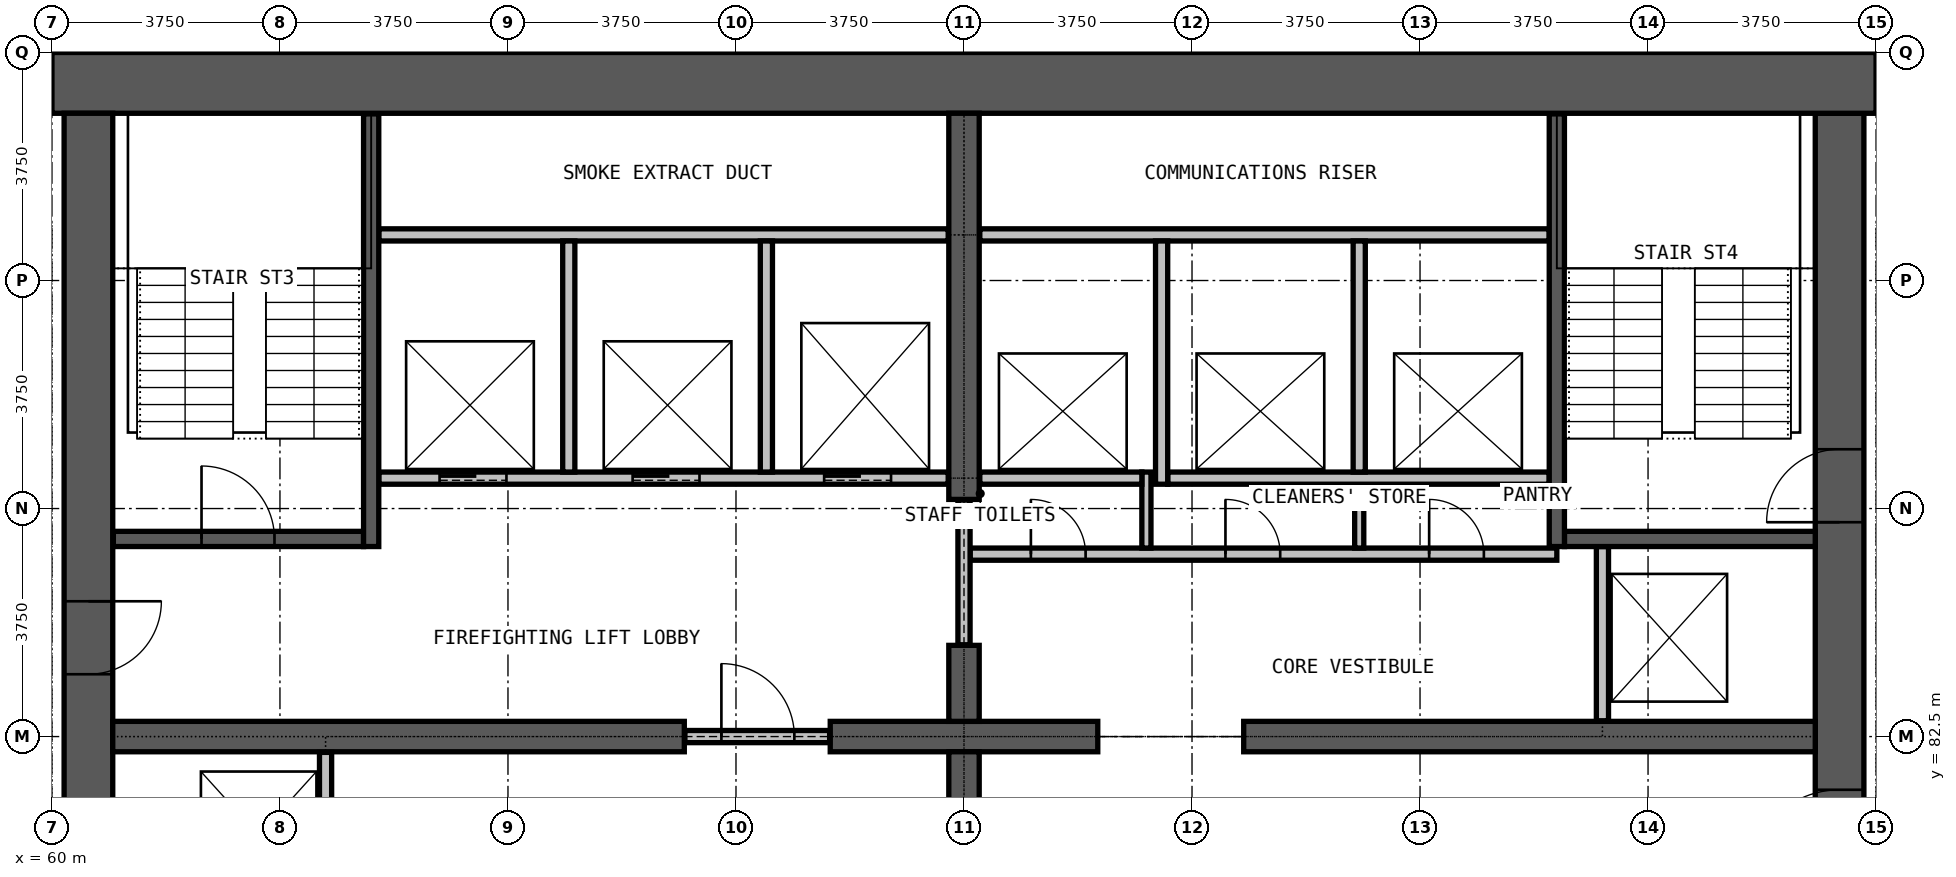
"""IFC4 building model, lengths in metres.
Left out: names, types, materials, properties, quantities, classifications, styles, units other than length and angle.
Written with IfcOpenShell. Run it as: python <this file> out.ifc"""

import sys

from ifc_helpers import new_model, si_unit, direction, frame, frame_2d, origin, place, context, subcontext, project, spatial, rectangle, extrude, element, fill, save


model = new_model("IFC4")
c1 = context("Model", 3, precision=1e-05, world=origin(), true_north=direction((0.0, 1.0)))
c2 = subcontext(c1, "Body", "Model", "MODEL_VIEW")
j1 = project(units=[si_unit("LENGTHUNIT", "METRE"), si_unit("PLANEANGLEUNIT", "RADIAN")], contexts=[c1])
p1 = place(None, origin())
s1 = spatial("IfcSite", under=j1, at=p1, CompositionType="ELEMENT")
p2 = place(p1, origin())
s2 = spatial("IfcBuilding", under=s1, at=p2, CompositionType="ELEMENT")
p3 = place(p2, frame((0.0, 0.0, 139.6)))
s3 = spatial("IfcBuildingStorey", under=s2, at=p3, CompositionType="ELEMENT", Elevation=139.6)
p4 = place(p3, frame((89.4, 72.25, 0.0), z_axis=(0.0, 0.0, 1.0), x_axis=(0.0, 1.0, 0.0)))
e1 = element("IfcWall", 1, at=p4, inside=s3, PredefinedType="SHEAR", context=c2, shape_type="SweptSolid", body=[
    extrude(rectangle(XDim=20.5, YDim=0.8, at=frame_2d((10.25, 0.0))), origin(), (0.0, 0.0, 1.0), 3.6),
])
p5 = place(p4, frame((0.275, 0.0, 0.0)))
e2 = element("IfcOpeningElement", 2, at=p5, cuts=e1, PredefinedType="OPENING", context=c2, shape_type="SweptSolid", body=[
    extrude(rectangle(XDim=1.2, YDim=2.2, at=frame_2d((0.6, 1.1))), frame((0.0, 0.41, 0.0), z_axis=(0.0, -1.0, 0.0), x_axis=(1.0, 0.0, 0.0)), (0.0, 0.0, 1.0), 0.82),
])
p6 = place(p4, frame((13.775, 0.0, 0.0)))
e3 = element("IfcOpeningElement", 3, at=p6, cuts=e1, PredefinedType="OPENING", context=c2, shape_type="SweptSolid", body=[
    extrude(rectangle(XDim=1.2, YDim=2.2, at=frame_2d((0.6, 1.1))), frame((0.0, 0.41, 0.0), z_axis=(0.0, -1.0, 0.0), x_axis=(1.0, 0.0, 0.0)), (0.0, 0.0, 1.0), 0.82),
])
p7 = place(p4, frame((7.875, 0.0, 0.0)))
e4 = element("IfcOpeningElement", 4, at=p7, cuts=e1, PredefinedType="OPENING", context=c2, shape_type="SweptSolid", body=[
    extrude(rectangle(XDim=1.5, YDim=2.2, at=frame_2d((0.75, 1.1))), frame((0.0, 0.41, 0.0), z_axis=(0.0, -1.0, 0.0), x_axis=(1.0, 0.0, 0.0)), (0.0, 0.0, 1.0), 0.82),
])
p8 = place(p3, frame((90.0, 93.25, 0.0), z_axis=(0.0, 0.0, 1.0), x_axis=(-1.0, 0.0, 0.0)))
e5 = element("IfcWall", 5, at=p8, inside=s3, PredefinedType="SHEAR", context=c2, shape_type="SweptSolid", body=[
    extrude(rectangle(XDim=30.0, YDim=1.0, at=frame_2d((15.0, 0.0))), origin(), (0.0, 0.0, 1.0), 3.6),
])
p9 = place(p3, frame((60.6, 92.75, 0.0), z_axis=(0.0, 0.0, 1.0), x_axis=(0.0, -1.0, 0.0)))
e6 = element("IfcWall", 6, at=p9, inside=s3, PredefinedType="SHEAR", context=c2, shape_type="SweptSolid", body=[
    extrude(rectangle(XDim=20.5, YDim=0.8, at=frame_2d((10.25, 0.0))), origin(), (0.0, 0.0, 1.0), 3.6),
])
p10 = place(p9, frame((19.025, 0.0, 0.0)))
e7 = element("IfcOpeningElement", 7, at=p10, cuts=e6, PredefinedType="OPENING", context=c2, shape_type="SweptSolid", body=[
    extrude(rectangle(XDim=1.2, YDim=2.2, at=frame_2d((0.6, 1.1))), frame((0.0, 0.41, 0.0), z_axis=(0.0, -1.0, 0.0), x_axis=(1.0, 0.0, 0.0)), (0.0, 0.0, 1.0), 0.82),
])
p11 = place(p9, frame((8.025, 0.0, 0.0)))
e8 = element("IfcOpeningElement", 8, at=p11, cuts=e6, PredefinedType="OPENING", context=c2, shape_type="SweptSolid", body=[
    extrude(rectangle(XDim=1.2, YDim=2.2, at=frame_2d((0.6, 1.1))), frame((0.0, 0.41, 0.0), z_axis=(0.0, -1.0, 0.0), x_axis=(1.0, 0.0, 0.0)), (0.0, 0.0, 1.0), 0.82),
])
p12 = place(p3, frame((61.0, 82.5, 0.0), z_axis=(0.0, 0.0, 1.0), x_axis=(1.0, 0.0, 0.0)))
e9 = element("IfcWall", 9, at=p12, inside=s3, PredefinedType="SHEAR", context=c2, shape_type="SweptSolid", body=[
    extrude(rectangle(XDim=9.4, YDim=0.5, at=frame_2d((4.7, 0.0))), origin(), (0.0, 0.0, 1.0), 3.6),
])
p13 = place(p3, frame((72.8, 82.5, 0.0), z_axis=(0.0, 0.0, 1.0), x_axis=(1.0, 0.0, 0.0)))
e10 = element("IfcWall", 10, at=p13, inside=s3, PredefinedType="SHEAR", context=c2, shape_type="SweptSolid", body=[
    extrude(rectangle(XDim=4.4, YDim=0.5, at=frame_2d((2.2, 0.0))), origin(), (0.0, 0.0, 1.0), 3.6),
])
p14 = place(p3, frame((79.6, 82.5, 0.0), z_axis=(0.0, 0.0, 1.0), x_axis=(1.0, 0.0, 0.0)))
e11 = element("IfcWall", 11, at=p14, inside=s3, PredefinedType="SHEAR", context=c2, shape_type="SweptSolid", body=[
    extrude(rectangle(XDim=9.4, YDim=0.5, at=frame_2d((4.7, 0.0))), origin(), (0.0, 0.0, 1.0), 3.6),
])
for number, where, z_axis, x_axis in (
    (12, (75.0, 81.0, 0.0), (0.0, 0.0, 1.0), (0.0, 1.0, 0.0)),
    (13, (75.0, 82.75, 0.0), (0.0, 0.0, 1.0), (0.0, 1.0, 0.0)),
):
    element("IfcWall", number, at=place(p3, frame(where, z_axis=z_axis, x_axis=x_axis)), inside=s3, PredefinedType="SHEAR", context=c2, shape_type="SweptSolid", body=[
        extrude(rectangle(XDim=1.25, YDim=0.5, at=frame_2d((0.625, 0.0))), origin(), (0.0, 0.0, 1.0), 3.6),
    ])
p15 = place(p3, frame((75.0, 86.4, 0.0), z_axis=(0.0, 0.0, 1.0), x_axis=(0.0, 1.0, 0.0)))
e14 = element("IfcWall", 14, at=p15, inside=s3, PredefinedType="SHEAR", context=c2, shape_type="SweptSolid", body=[
    extrude(rectangle(XDim=6.35, YDim=0.5, at=frame_2d((3.175, 0.0))), origin(), (0.0, 0.0, 1.0), 3.6),
])
p16 = place(p3, frame((70.41, 82.5, 0.0), z_axis=(0.0, 0.0, 1.0), x_axis=(1.0, 0.0, 0.0)))
e15 = element("IfcWall", 15, at=p16, inside=s3, PredefinedType="PARTITIONING", context=c2, shape_type="SweptSolid", body=[
    extrude(rectangle(XDim=2.38, YDim=0.2, at=frame_2d((1.19, 0.0))), origin(), (0.0, 0.0, 1.0), 2.4),
])
p17 = place(p16, frame((0.6, 0.0, 0.0)))
e16 = element("IfcOpeningElement", 16, at=p17, cuts=e15, PredefinedType="OPENING", context=c2, shape_type="SweptSolid", body=[
    extrude(rectangle(XDim=1.2, YDim=2.2, at=frame_2d((0.6, 1.1))), frame((0.0, 0.11, 0.0), z_axis=(0.0, -1.0, 0.0), x_axis=(1.0, 0.0, 0.0)), (0.0, 0.0, 1.0), 0.22),
])
p18 = place(p3, frame((75.1, 85.5, 0.0), z_axis=(0.0, 0.0, 1.0), x_axis=(1.0, 0.0, 0.0)))
e17 = element("IfcWall", 17, at=p18, inside=s3, PredefinedType="PARTITIONING", context=c2, shape_type="SweptSolid", body=[
    extrude(rectangle(XDim=9.65, YDim=0.2, at=frame_2d((4.825, 0.0))), origin(), (0.0, 0.0, 1.0), 3.3),
])
p19 = place(p18, frame((1.0, 0.0, 0.0)))
e18 = element("IfcOpeningElement", 18, at=p19, cuts=e17, PredefinedType="OPENING", context=c2, shape_type="SweptSolid", body=[
    extrude(rectangle(XDim=0.9, YDim=2.2, at=frame_2d((0.45, 1.1))), frame((0.0, 0.11, 0.0), z_axis=(0.0, -1.0, 0.0), x_axis=(1.0, 0.0, 0.0)), (0.0, 0.0, 1.0), 0.22),
])
p20 = place(p18, frame((4.2, 0.0, 0.0)))
e19 = element("IfcOpeningElement", 19, at=p20, cuts=e17, PredefinedType="OPENING", context=c2, shape_type="SweptSolid", body=[
    extrude(rectangle(XDim=0.9, YDim=2.2, at=frame_2d((0.45, 1.1))), frame((0.0, 0.11, 0.0), z_axis=(0.0, -1.0, 0.0), x_axis=(1.0, 0.0, 0.0)), (0.0, 0.0, 1.0), 0.22),
])
p21 = place(p18, frame((7.55, 0.0, 0.0)))
e20 = element("IfcOpeningElement", 20, at=p21, cuts=e17, PredefinedType="OPENING", context=c2, shape_type="SweptSolid", body=[
    extrude(rectangle(XDim=0.9, YDim=2.2, at=frame_2d((0.45, 1.1))), frame((0.0, 0.11, 0.0), z_axis=(0.0, -1.0, 0.0), x_axis=(1.0, 0.0, 0.0)), (0.0, 0.0, 1.0), 0.22),
])
p22 = place(p3, frame((75.0, 84.01, 0.0), z_axis=(0.0, 0.0, 1.0), x_axis=(0.0, 1.0, 0.0)))
e21 = element("IfcWall", 21, at=p22, inside=s3, PredefinedType="PARTITIONING", context=c2, shape_type="SweptSolid", body=[
    extrude(rectangle(XDim=2.38, YDim=0.2, at=frame_2d((1.19, 0.0))), origin(), (0.0, 0.0, 1.0), 2.4),
])
p23 = place(p3, frame((78.0, 85.6, 0.0), z_axis=(0.0, 0.0, 1.0), x_axis=(0.0, 1.0, 0.0)))
e22 = element("IfcWall", 22, at=p23, inside=s3, PredefinedType="PARTITIONING", context=c2, shape_type="SweptSolid", body=[
    extrude(rectangle(XDim=1.25, YDim=0.15, at=frame_2d((0.625, 0.0))), origin(), (0.0, 0.0, 1.0), 3.3),
])
p24 = place(p3, frame((81.5, 85.6, 0.0), z_axis=(0.0, 0.0, 1.0), x_axis=(0.0, 1.0, 0.0)))
e23 = element("IfcWall", 23, at=p24, inside=s3, PredefinedType="PARTITIONING", context=c2, shape_type="SweptSolid", body=[
    extrude(rectangle(XDim=1.05, YDim=0.15, at=frame_2d((0.525, 0.0))), origin(), (0.0, 0.0, 1.0), 3.3),
])
p25 = place(p3, frame((65.375, 86.75, 0.0), z_axis=(0.0, 0.0, 1.0), x_axis=(1.0, 0.0, 0.0)))
e24 = element("IfcWall", 24, at=p25, inside=s3, PredefinedType="PARTITIONING", context=c2, shape_type="SweptSolid", body=[
    extrude(rectangle(XDim=9.365, YDim=0.2, at=frame_2d((4.683, 0.0))), origin(), (0.0, 0.0, 1.0), 3.3),
])
p26 = place(p25, frame((1.0, 0.0, 0.0)))
e25 = element("IfcOpeningElement", 25, at=p26, cuts=e24, PredefinedType="OPENING", context=c2, shape_type="SweptSolid", body=[
    extrude(rectangle(XDim=1.1, YDim=2.2, at=frame_2d((0.55, 1.1))), frame((0.0, 0.11, 0.0), z_axis=(0.0, -1.0, 0.0), x_axis=(1.0, 0.0, 0.0)), (0.0, 0.0, 1.0), 0.22),
])
p27 = place(p25, frame((4.175, 0.0, 0.0)))
e26 = element("IfcOpeningElement", 26, at=p27, cuts=e24, PredefinedType="OPENING", context=c2, shape_type="SweptSolid", body=[
    extrude(rectangle(XDim=1.1, YDim=2.2, at=frame_2d((0.55, 1.1))), frame((0.0, 0.11, 0.0), z_axis=(0.0, -1.0, 0.0), x_axis=(1.0, 0.0, 0.0)), (0.0, 0.0, 1.0), 0.22),
])
p28 = place(p25, frame((7.325, 0.0, 0.0)))
e27 = element("IfcOpeningElement", 27, at=p28, cuts=e24, PredefinedType="OPENING", context=c2, shape_type="SweptSolid", body=[
    extrude(rectangle(XDim=1.1, YDim=2.2, at=frame_2d((0.55, 1.1))), frame((0.0, 0.11, 0.0), z_axis=(0.0, -1.0, 0.0), x_axis=(1.0, 0.0, 0.0)), (0.0, 0.0, 1.0), 0.22),
])
p29 = place(p3, frame((75.26, 86.75, 0.0), z_axis=(0.0, 0.0, 1.0), x_axis=(1.0, 0.0, 0.0)))
e28 = element("IfcWall", 28, at=p29, inside=s3, PredefinedType="PARTITIONING", context=c2, shape_type="SweptSolid", body=[
    extrude(rectangle(XDim=2.665, YDim=0.2, at=frame_2d((1.333, 0.0))), origin(), (0.0, 0.0, 1.0), 3.3),
])
p30 = place(p3, frame((78.35, 86.75, 0.0), z_axis=(0.0, 0.0, 1.0), x_axis=(1.0, 0.0, 0.0)))
e29 = element("IfcWall", 29, at=p30, inside=s3, PredefinedType="PARTITIONING", context=c2, shape_type="SweptSolid", body=[
    extrude(rectangle(XDim=6.275, YDim=0.2, at=frame_2d((3.137, 0.0))), origin(), (0.0, 0.0, 1.0), 3.3),
])
for number, where, z_axis, x_axis in (
    (30, (65.375, 90.75, 0.0), (0.0, 0.0, 1.0), (1.0, 0.0, 0.0)),
    (31, (75.26, 90.75, 0.0), (0.0, 0.0, 1.0), (1.0, 0.0, 0.0)),
):
    element("IfcWall", number, at=place(p3, frame(where, z_axis=z_axis, x_axis=x_axis)), inside=s3, PredefinedType="PARTITIONING", context=c2, shape_type="SweptSolid", body=[
        extrude(rectangle(XDim=9.365, YDim=0.2, at=frame_2d((4.683, 0.0))), origin(), (0.0, 0.0, 1.0), 3.3),
    ])
p31 = place(p3, frame((64.5, 79.375, 0.0), z_axis=(0.0, 0.0, 1.0), x_axis=(0.0, 1.0, 0.0)))
e32 = element("IfcWall", 32, at=p31, inside=s3, PredefinedType="PARTITIONING", context=c2, shape_type="SweptSolid", body=[
    extrude(rectangle(XDim=2.865, YDim=0.2, at=frame_2d((1.433, 0.0))), origin(), (0.0, 0.0, 1.0), 3.3),
])
for number, where, z_axis, x_axis in (
    (33, (68.5, 86.85, 0.0), (0.0, 0.0, 1.0), (0.0, 1.0, 0.0)),
    (34, (71.75, 86.85, 0.0), (0.0, 0.0, 1.0), (0.0, 1.0, 0.0)),
):
    element("IfcWall", number, at=place(p3, frame(where, z_axis=z_axis, x_axis=x_axis)), inside=s3, PredefinedType="PARTITIONING", context=c2, shape_type="SweptSolid", body=[
        extrude(rectangle(XDim=3.8, YDim=0.2, at=frame_2d((1.9, 0.0))), origin(), (0.0, 0.0, 1.0), 3.3),
    ])
p32 = place(p3, frame((78.25, 86.65, 0.0), z_axis=(0.0, 0.0, 1.0), x_axis=(0.0, 1.0, 0.0)))
e35 = element("IfcWall", 35, at=p32, inside=s3, PredefinedType="PARTITIONING", context=c2, shape_type="SweptSolid", body=[
    extrude(rectangle(XDim=4.0, YDim=0.2, at=frame_2d((2.0, 0.0))), origin(), (0.0, 0.0, 1.0), 3.3),
])
p33 = place(p3, frame((81.5, 86.85, 0.0), z_axis=(0.0, 0.0, 1.0), x_axis=(0.0, 1.0, 0.0)))
e36 = element("IfcWall", 36, at=p33, inside=s3, PredefinedType="PARTITIONING", context=c2, shape_type="SweptSolid", body=[
    extrude(rectangle(XDim=3.8, YDim=0.2, at=frame_2d((1.9, 0.0))), origin(), (0.0, 0.0, 1.0), 3.3),
])
p34 = place(p3, frame((85.5, 82.76, 0.0), z_axis=(0.0, 0.0, 1.0), x_axis=(0.0, 1.0, 0.0)))
e37 = element("IfcWall", 37, at=p34, inside=s3, PredefinedType="PARTITIONING", context=c2, shape_type="SweptSolid", body=[
    extrude(rectangle(XDim=2.865, YDim=0.2, at=frame_2d((1.433, 0.0))), origin(), (0.0, 0.0, 1.0), 3.3),
])
p35 = place(p3, frame((61.01, 85.75, 0.0), z_axis=(0.0, 0.0, 1.0), x_axis=(1.0, 0.0, 0.0)))
e38 = element("IfcWall", 38, at=p35, inside=s3, PredefinedType="PARTITIONING", context=c2, shape_type="SweptSolid", body=[
    extrude(rectangle(XDim=4.115, YDim=0.25, at=frame_2d((2.058, 0.0))), origin(), (0.0, 0.0, 1.0), 3.3),
])
p36 = place(p35, frame((1.45, 0.0, 0.0)))
e39 = element("IfcOpeningElement", 39, at=p36, cuts=e38, PredefinedType="OPENING", context=c2, shape_type="SweptSolid", body=[
    extrude(rectangle(XDim=1.2, YDim=2.2, at=frame_2d((0.6, 1.1))), frame((0.0, 0.135, 0.0), z_axis=(0.0, -1.0, 0.0), x_axis=(1.0, 0.0, 0.0)), (0.0, 0.0, 1.0), 0.27),
])
p37 = place(p3, frame((84.875, 85.75, 0.0), z_axis=(0.0, 0.0, 1.0), x_axis=(1.0, 0.0, 0.0)))
e40 = element("IfcWall", 40, at=p37, inside=s3, PredefinedType="PARTITIONING", context=c2, shape_type="SweptSolid", body=[
    extrude(rectangle(XDim=4.125, YDim=0.25, at=frame_2d((2.062, 0.0))), origin(), (0.0, 0.0, 1.0), 3.3),
])
for number, where, z_axis, x_axis in (
    (41, (65.25, 85.625, 0.0), (0.0, 0.0, 1.0), (0.0, 1.0, 0.0)),
    (42, (84.75, 85.625, 0.0), (0.0, 0.0, 1.0), (0.0, 1.0, 0.0)),
):
    element("IfcWall", number, at=place(p3, frame(where, z_axis=z_axis, x_axis=x_axis)), inside=s3, PredefinedType="PARTITIONING", context=c2, shape_type="SweptSolid", body=[
        extrude(rectangle(XDim=7.115, YDim=0.25, at=frame_2d((3.558, 0.0))), origin(), (0.0, 0.0, 1.0), 3.3),
    ])
p38 = place(p26, origin())
e43 = element("IfcDoor", 43, at=p38, inside=s3, OperationType="DOUBLE_DOOR_SLIDING", PredefinedType="DOOR", context=c2, shape_type="SweptSolid", body=[
    extrude(rectangle(XDim=1.1, YDim=2.2, at=frame_2d((0.55, 1.1))), frame((0.0, 0.025, 0.0), z_axis=(0.0, -1.0, 0.0), x_axis=(1.0, 0.0, 0.0)), (0.0, 0.0, 1.0), 0.05),
])
fill(e25, e43)
p39 = place(p27, origin())
e44 = element("IfcDoor", 44, at=p39, inside=s3, OperationType="DOUBLE_DOOR_SLIDING", PredefinedType="DOOR", context=c2, shape_type="SweptSolid", body=[
    extrude(rectangle(XDim=1.1, YDim=2.2, at=frame_2d((0.55, 1.1))), frame((0.0, 0.025, 0.0), z_axis=(0.0, -1.0, 0.0), x_axis=(1.0, 0.0, 0.0)), (0.0, 0.0, 1.0), 0.05),
])
fill(e26, e44)
p40 = place(p28, origin())
e45 = element("IfcDoor", 45, at=p40, inside=s3, OperationType="DOUBLE_DOOR_SLIDING", PredefinedType="DOOR", context=c2, shape_type="SweptSolid", body=[
    extrude(rectangle(XDim=1.1, YDim=2.2, at=frame_2d((0.55, 1.1))), frame((0.0, 0.025, 0.0), z_axis=(0.0, -1.0, 0.0), x_axis=(1.0, 0.0, 0.0)), (0.0, 0.0, 1.0), 0.05),
])
fill(e27, e45)
p41 = place(p17, origin())
e46 = element("IfcDoor", 46, at=p41, inside=s3, OperationType="SINGLE_SWING_RIGHT", PredefinedType="DOOR", context=c2, shape_type="SweptSolid", body=[
    extrude(rectangle(XDim=1.2, YDim=2.2, at=frame_2d((0.6, 1.1))), frame((0.0, 0.025, 0.0), z_axis=(0.0, -1.0, 0.0), x_axis=(1.0, 0.0, 0.0)), (0.0, 0.0, 1.0), 0.05),
])
fill(e16, e46)
p42 = place(p36, origin())
e47 = element("IfcDoor", 47, at=p42, inside=s3, OperationType="SINGLE_SWING_RIGHT", PredefinedType="DOOR", context=c2, shape_type="SweptSolid", body=[
    extrude(rectangle(XDim=1.2, YDim=2.2, at=frame_2d((0.6, 1.1))), frame((0.0, 0.025, 0.0), z_axis=(0.0, -1.0, 0.0), x_axis=(1.0, 0.0, 0.0)), (0.0, 0.0, 1.0), 0.05),
])
fill(e39, e47)
p43 = place(p6, origin())
e48 = element("IfcDoor", 48, at=p43, inside=s3, OperationType="SINGLE_SWING_RIGHT", PredefinedType="DOOR", context=c2, shape_type="SweptSolid", body=[
    extrude(rectangle(XDim=1.2, YDim=2.2, at=frame_2d((0.6, 1.1))), frame((0.0, 0.025, 0.0), z_axis=(0.0, -1.0, 0.0), x_axis=(1.0, 0.0, 0.0)), (0.0, 0.0, 1.0), 0.05),
])
fill(e3, e48)
p44 = place(p7, origin())
e49 = element("IfcDoor", 49, at=p44, inside=s3, OperationType="DOUBLE_DOOR_SINGLE_SWING", PredefinedType="DOOR", context=c2, shape_type="SweptSolid", body=[
    extrude(rectangle(XDim=1.5, YDim=2.2, at=frame_2d((0.75, 1.1))), frame((0.0, 0.025, 0.0), z_axis=(0.0, -1.0, 0.0), x_axis=(1.0, 0.0, 0.0)), (0.0, 0.0, 1.0), 0.05),
])
fill(e4, e49)
p45 = place(p11, origin())
e50 = element("IfcDoor", 50, at=p45, inside=s3, OperationType="SINGLE_SWING_LEFT", PredefinedType="DOOR", context=c2, shape_type="SweptSolid", body=[
    extrude(rectangle(XDim=1.2, YDim=2.2, at=frame_2d((0.6, 1.1))), frame((0.0, 0.025, 0.0), z_axis=(0.0, -1.0, 0.0), x_axis=(1.0, 0.0, 0.0)), (0.0, 0.0, 1.0), 0.05),
])
fill(e8, e50)
p46 = place(p19, origin())
e51 = element("IfcDoor", 51, at=p46, inside=s3, OperationType="SINGLE_SWING_LEFT", PredefinedType="DOOR", context=c2, shape_type="SweptSolid", body=[
    extrude(rectangle(XDim=0.9, YDim=2.2, at=frame_2d((0.45, 1.1))), frame((0.0, 0.025, 0.0), z_axis=(0.0, -1.0, 0.0), x_axis=(1.0, 0.0, 0.0)), (0.0, 0.0, 1.0), 0.05),
])
fill(e18, e51)
p47 = place(p20, origin())
e52 = element("IfcDoor", 52, at=p47, inside=s3, OperationType="SINGLE_SWING_LEFT", PredefinedType="DOOR", context=c2, shape_type="SweptSolid", body=[
    extrude(rectangle(XDim=0.9, YDim=2.2, at=frame_2d((0.45, 1.1))), frame((0.0, 0.025, 0.0), z_axis=(0.0, -1.0, 0.0), x_axis=(1.0, 0.0, 0.0)), (0.0, 0.0, 1.0), 0.05),
])
fill(e19, e52)
p48 = place(p21, origin())
e53 = element("IfcDoor", 53, at=p48, inside=s3, OperationType="SINGLE_SWING_RIGHT", PredefinedType="DOOR", context=c2, shape_type="SweptSolid", body=[
    extrude(rectangle(XDim=0.9, YDim=2.2, at=frame_2d((0.45, 1.1))), frame((0.0, 0.025, 0.0), z_axis=(0.0, -1.0, 0.0), x_axis=(1.0, 0.0, 0.0)), (0.0, 0.0, 1.0), 0.05),
])
fill(e20, e53)
save(model, sys.argv[1])
